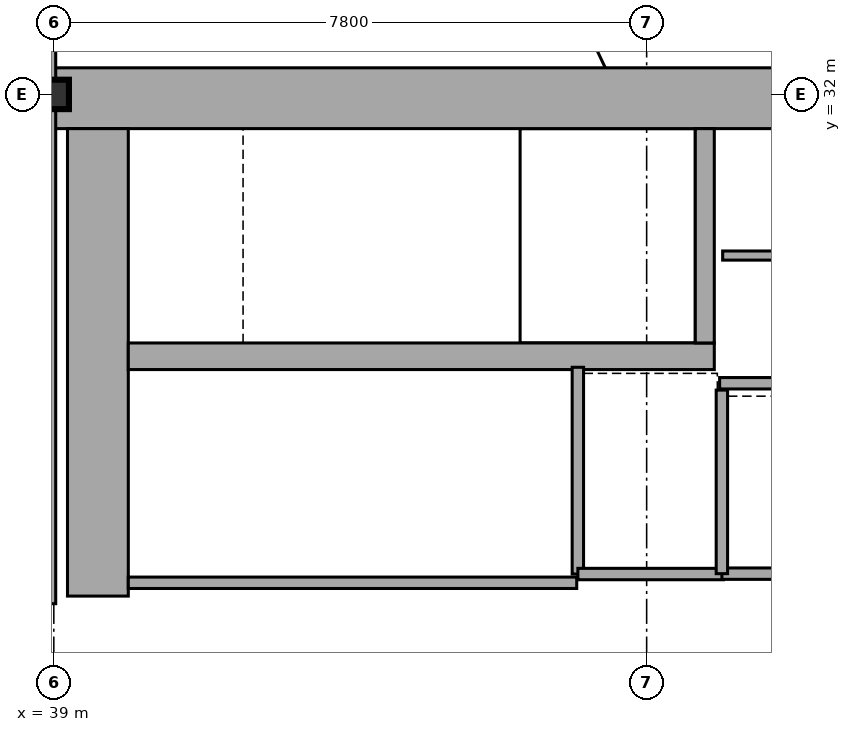
"""IFC4 building model, lengths in metres.
Left out: names, types, materials, properties, quantities, classifications, styles, units other than length and angle.
Written with IfcOpenShell. Run it as: python <this file> out.ifc"""

import sys

from ifc_helpers import new_model, si_unit, direction, frame, frame_2d, origin, origin_2d, place, context, subcontext, project, spatial, rectangle, i_section, extrude, element, fill, save


model = new_model("IFC4")
c1 = context("Model", 3, precision=1e-05, world=origin(), true_north=direction((0.0, 1.0)))
c2 = subcontext(c1, "Body", "Model", "MODEL_VIEW")
j1 = project(units=[si_unit("LENGTHUNIT", "METRE"), si_unit("PLANEANGLEUNIT", "RADIAN")], contexts=[c1])
p1 = place(None, origin())
s1 = spatial("IfcSite", under=j1, at=p1, CompositionType="ELEMENT")
p2 = place(p1, origin())
s2 = spatial("IfcBuilding", under=s1, at=p2, CompositionType="ELEMENT")
p3 = place(p2, frame((0.0, 0.0, 112.05)))
s3 = spatial("IfcBuildingStorey", under=s2, at=p3, CompositionType="ELEMENT", Elevation=112.05)
p4 = place(p3, frame((38.8, 31.95, 0.0), z_axis=(0.0, 0.0, 1.0), x_axis=(1.0, 0.0, 0.0)))
e1 = element("IfcWall", 1, at=p4, inside=s3, PredefinedType="SHEAR", context=c2, shape_type="SweptSolid", body=[
    extrude(rectangle(XDim=16.0, YDim=0.8, at=frame_2d((8.0, 0.0))), origin(), (0.0, 0.0, 1.0), 4.56),
])
p5 = place(p3, frame((39.58, 25.4, 0.0), z_axis=(0.0, 0.0, 1.0), x_axis=(0.0, 1.0, 0.0)))
e2 = element("IfcWall", 2, at=p5, inside=s3, PredefinedType="SHEAR", context=c2, shape_type="SweptSolid", body=[
    extrude(rectangle(XDim=6.15, YDim=0.8, at=frame_2d((3.075, 0.0))), origin(), (0.0, 0.0, 1.0), 4.56),
])
p6 = place(p3, frame((39.98, 28.555, 0.0), z_axis=(0.0, 0.0, 1.0), x_axis=(1.0, 0.0, 0.0)))
e3 = element("IfcWall", 3, at=p6, inside=s3, PredefinedType="SHEAR", context=c2, shape_type="SweptSolid", body=[
    extrude(rectangle(XDim=7.71, YDim=0.35, at=frame_2d((3.855, 0.0))), origin(), (0.0, 0.0, 1.0), 4.56),
])
p7 = place(p6, frame((0.25, 0.0, 0.0)))
e4 = element("IfcOpeningElement", 4, at=p7, cuts=e3, PredefinedType="OPENING", context=c2, shape_type="SweptSolid", body=[
    extrude(rectangle(XDim=1.1, YDim=2.15, at=frame_2d((0.55, 1.075))), frame((0.0, 0.185, 0.0), z_axis=(0.0, -1.0, 0.0), x_axis=(1.0, 0.0, 0.0)), (0.0, 0.0, 1.0), 0.37),
])
p8 = place(p3, frame((47.565, 28.73, 0.0), z_axis=(0.0, 0.0, 1.0), x_axis=(0.0, 1.0, 0.0)))
e5 = element("IfcWall", 5, at=p8, inside=s3, PredefinedType="SHEAR", context=c2, shape_type="SweptSolid", body=[
    extrude(rectangle(XDim=2.82, YDim=0.25, at=frame_2d((1.41, 0.0))), origin(), (0.0, 0.0, 1.0), 4.56),
])
p9 = place(p3, frame((39.0, 32.0, 0.0), z_axis=(0.0, 0.0, 1.0), x_axis=(1.0, 0.0, 0.0)))
e6 = element("IfcColumn", 6, at=p9, inside=s3, PredefinedType="COLUMN", context=c2, shape_type="SweptSolid", body=[
    extrude(i_section(OverallWidth=0.398, OverallDepth=0.387, WebThickness=0.021, FlangeThickness=0.033, at=origin_2d()), origin(), (0.0, 0.0, 1.0), 4.794),
])
p10 = place(p3, frame((39.98, 25.575, 0.0), z_axis=(0.0, 0.0, 1.0), x_axis=(1.0, 0.0, 0.0)))
e7 = element("IfcWall", 7, at=p10, inside=s3, PredefinedType="PARTITIONING", context=c2, shape_type="SweptSolid", body=[
    extrude(rectangle(XDim=5.9, YDim=0.15, at=frame_2d((2.95, 0.0))), origin(), (0.0, 0.0, 1.0), 4.56),
])
p11 = place(p10, frame((2.35, 0.0, 0.0)))
e8 = element("IfcOpeningElement", 8, at=p11, cuts=e7, PredefinedType="OPENING", context=c2, shape_type="SweptSolid", body=[
    extrude(rectangle(XDim=1.05, YDim=2.15, at=frame_2d((0.525, 1.075))), frame((0.0, 0.085, 0.0), z_axis=(0.0, -1.0, 0.0), x_axis=(1.0, 0.0, 0.0)), (0.0, 0.0, 1.0), 0.17),
])
p12 = place(p3, frame((45.895, 25.69, 0.0), z_axis=(0.0, 0.0, 1.0), x_axis=(0.0, 1.0, 0.0)))
e9 = element("IfcWall", 9, at=p12, inside=s3, PredefinedType="PARTITIONING", context=c2, shape_type="SweptSolid", body=[
    extrude(rectangle(XDim=2.72, YDim=0.15, at=frame_2d((1.36, 0.0))), origin(), (0.0, 0.0, 1.0), 4.56),
])
p13 = place(p12, frame((0.81, 0.0, 0.0)))
e10 = element("IfcOpeningElement", 10, at=p13, cuts=e9, PredefinedType="OPENING", context=c2, shape_type="SweptSolid", body=[
    extrude(rectangle(XDim=1.1, YDim=2.15, at=frame_2d((0.55, 1.075))), frame((0.0, 0.085, 0.0), z_axis=(0.0, -1.0, 0.0), x_axis=(1.0, 0.0, 0.0)), (0.0, 0.0, 1.0), 0.17),
])
p14 = place(p3, frame((45.895, 25.69, 0.0), z_axis=(0.0, 0.0, 1.0), x_axis=(1.0, 0.0, 0.0)))
e11 = element("IfcWall", 11, at=p14, inside=s3, PredefinedType="PARTITIONING", context=c2, shape_type="SweptSolid", body=[
    extrude(rectangle(XDim=1.915, YDim=0.15, at=frame_2d((0.958, 0.0))), origin(), (0.0, 0.0, 1.0), 4.56),
])
p15 = place(p3, frame((47.79, 25.695, 0.0), z_axis=(0.0, 0.0, 1.0), x_axis=(1.0, 0.0, 0.0)))
e12 = element("IfcWall", 12, at=p15, inside=s3, PredefinedType="PARTITIONING", context=c2, shape_type="SweptSolid", body=[
    extrude(rectangle(XDim=1.92, YDim=0.15, at=frame_2d((0.96, 0.0))), origin(), (0.0, 0.0, 1.0), 4.56),
])
p16 = place(p15, frame((0.41, 0.0, 0.0)))
e13 = element("IfcOpeningElement", 13, at=p16, cuts=e12, PredefinedType="OPENING", context=c2, shape_type="SweptSolid", body=[
    extrude(rectangle(XDim=1.1, YDim=2.15, at=frame_2d((0.55, 1.075))), frame((0.0, 0.085, 0.0), z_axis=(0.0, -1.0, 0.0), x_axis=(1.0, 0.0, 0.0)), (0.0, 0.0, 1.0), 0.17),
])
p17 = place(p3, frame((47.79, 25.695, 0.0), z_axis=(0.0, 0.0, 1.0), x_axis=(0.0, 1.0, 0.0)))
e14 = element("IfcWall", 14, at=p17, inside=s3, PredefinedType="PARTITIONING", context=c2, shape_type="SweptSolid", body=[
    extrude(rectangle(XDim=2.415, YDim=0.15, at=frame_2d((1.208, 0.0))), origin(), (0.0, 0.0, 1.0), 4.56),
])
p18 = place(p3, frame((47.76, 28.2, 0.0), z_axis=(0.0, 0.0, 1.0), x_axis=(1.0, 0.0, 0.0)))
e15 = element("IfcWall", 15, at=p18, inside=s3, PredefinedType="PARTITIONING", context=c2, shape_type="SweptSolid", body=[
    extrude(rectangle(XDim=1.99, YDim=0.15, at=frame_2d((0.995, 0.0))), origin(), (0.0, 0.0, 1.0), 4.56),
])
p19 = place(p3, frame((47.8, 29.88, 0.0), z_axis=(0.0, 0.0, 1.0), x_axis=(1.0, 0.0, 0.0)))
e16 = element("IfcWall", 16, at=p19, inside=s3, PredefinedType="PARTITIONING", context=c2, shape_type="SweptSolid", body=[
    extrude(rectangle(XDim=5.86, YDim=0.12, at=frame_2d((2.93, 0.0))), origin(), (0.0, 0.0, 1.0), 4.56),
])
p20 = place(p19, frame((2.5, 0.0, 0.0)))
e17 = element("IfcOpeningElement", 17, at=p20, cuts=e16, PredefinedType="OPENING", context=c2, shape_type="SweptSolid", body=[
    extrude(rectangle(XDim=0.85, YDim=2.15, at=frame_2d((0.425, 1.075))), frame((0.0, 0.07, 0.0), z_axis=(0.0, -1.0, 0.0), x_axis=(1.0, 0.0, 0.0)), (0.0, 0.0, 1.0), 0.14),
])
p21 = place(p3, frame((38.95, 25.3, 0.0), z_axis=(0.0, 0.0, 1.0), x_axis=(0.0, 1.0, 0.0)))
e18 = element("IfcWall", 18, at=p21, inside=s3, PredefinedType="PARTITIONING", context=c2, shape_type="SweptSolid", body=[
    extrude(rectangle(XDim=8.2, YDim=0.15, at=frame_2d((4.1, 0.0))), origin(), (0.0, 0.0, 1.0), 3.94),
])
p22 = place(p11, origin())
e19 = element("IfcDoor", 19, at=p22, inside=s3, OperationType="SINGLE_SWING_LEFT", PredefinedType="DOOR", context=c2, shape_type="SweptSolid", body=[
    extrude(rectangle(XDim=1.05, YDim=2.15, at=frame_2d((0.525, 1.075))), frame((0.0, 0.025, 0.0), z_axis=(0.0, -1.0, 0.0), x_axis=(1.0, 0.0, 0.0)), (0.0, 0.0, 1.0), 0.05),
])
fill(e8, e19)
p23 = place(p13, frame((1.1, 0.0, 0.0), z_axis=(0.0, 0.0, 1.0), x_axis=(-1.0, 0.0, 0.0)))
e20 = element("IfcDoor", 20, at=p23, inside=s3, OperationType="DOUBLE_DOOR_SLIDING", PredefinedType="DOOR", context=c2, shape_type="SweptSolid", body=[
    extrude(rectangle(XDim=1.1, YDim=2.15, at=frame_2d((0.55, 1.075))), frame((0.0, 0.025, 0.0), z_axis=(0.0, -1.0, 0.0), x_axis=(1.0, 0.0, 0.0)), (0.0, 0.0, 1.0), 0.05),
])
fill(e10, e20)
p24 = place(p16, frame((1.1, 0.0, 0.0), z_axis=(0.0, 0.0, 1.0), x_axis=(-1.0, 0.0, 0.0)))
e21 = element("IfcDoor", 21, at=p24, inside=s3, OperationType="DOUBLE_DOOR_SLIDING", PredefinedType="DOOR", context=c2, shape_type="SweptSolid", body=[
    extrude(rectangle(XDim=1.1, YDim=2.15, at=frame_2d((0.55, 1.075))), frame((0.0, 0.025, 0.0), z_axis=(0.0, -1.0, 0.0), x_axis=(1.0, 0.0, 0.0)), (0.0, 0.0, 1.0), 0.05),
])
fill(e13, e21)
p25 = place(p7, origin())
e22 = element("IfcDoor", 22, at=p25, inside=s3, OperationType="SINGLE_SWING_RIGHT", PredefinedType="DOOR", context=c2, shape_type="SweptSolid", body=[
    extrude(rectangle(XDim=1.1, YDim=2.15, at=frame_2d((0.55, 1.075))), frame((0.0, 0.025, 0.0), z_axis=(0.0, -1.0, 0.0), x_axis=(1.0, 0.0, 0.0)), (0.0, 0.0, 1.0), 0.05),
])
fill(e4, e22)
save(model, sys.argv[1])
